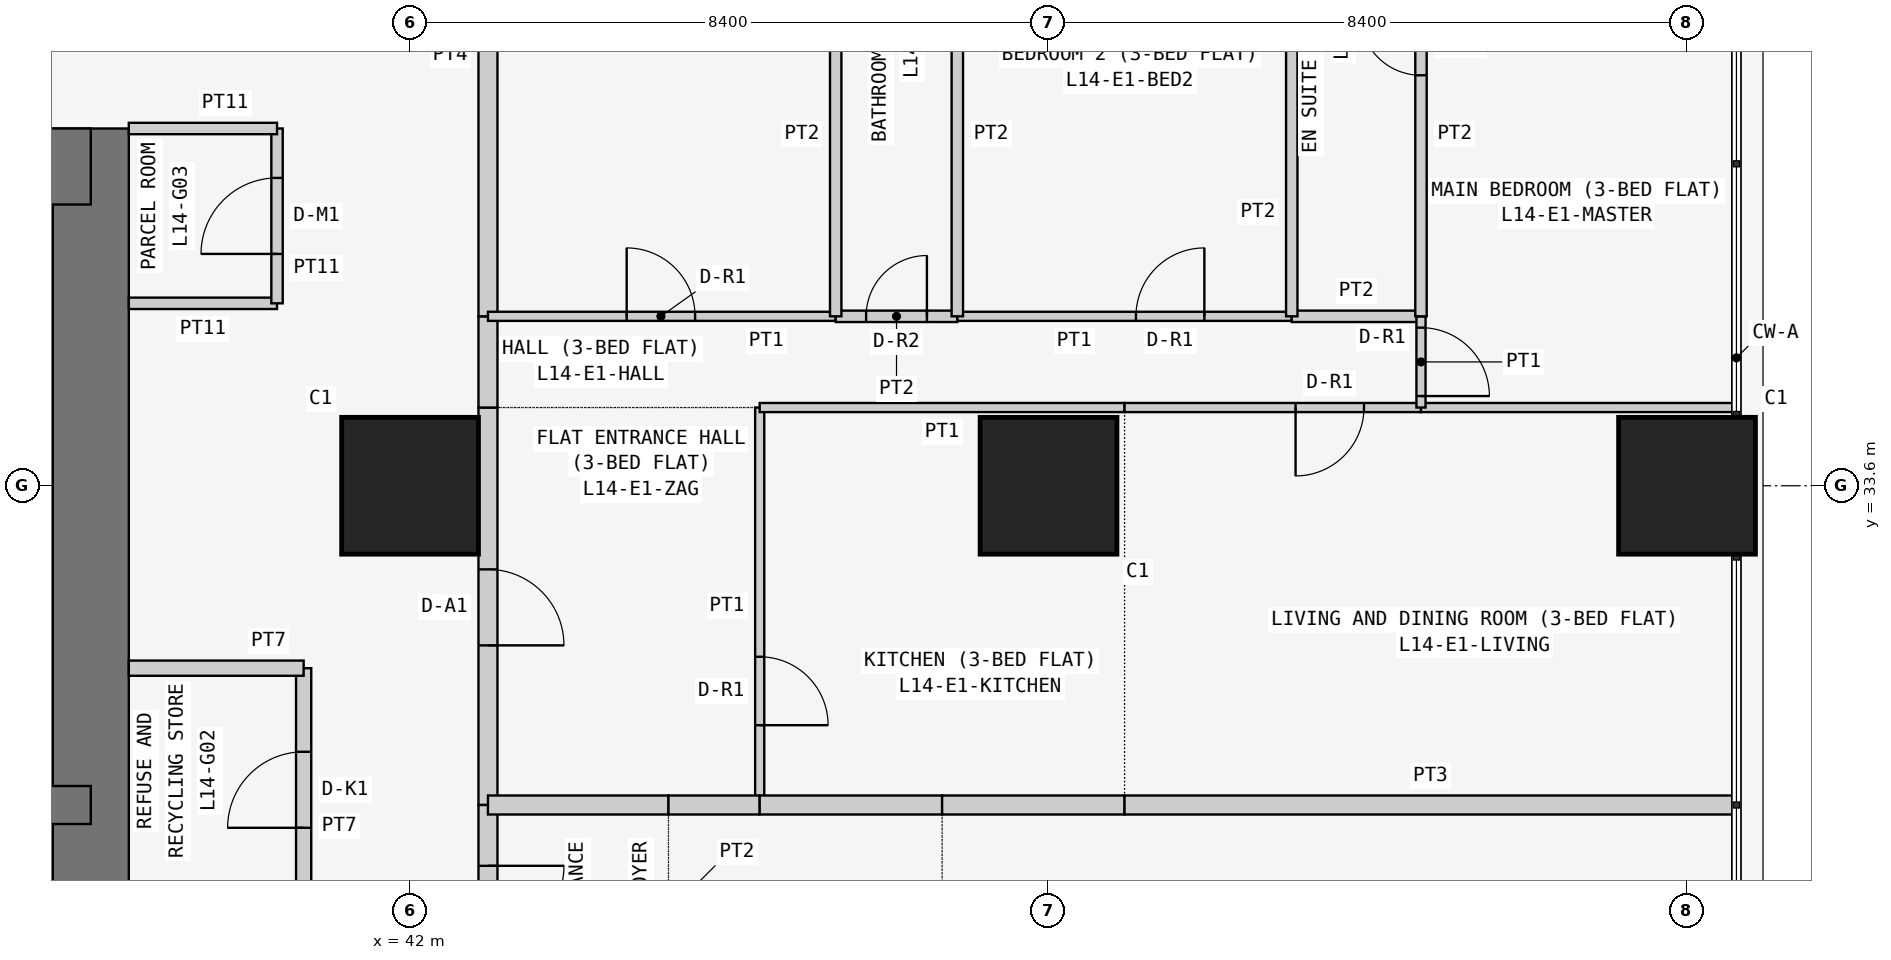
"""IFC4 building model, lengths in metres.
Left out: names, types, materials, properties, quantities, classifications, styles, units other than length and angle.
Written with IfcOpenShell. Run it as: python <this file> out.ifc"""

import sys

from ifc_helpers import new_model, si_unit, direction, frame, frame_2d, origin, origin_2d, place, context, subcontext, project, spatial, rectangle, extrude, element, fill, save


model = new_model("IFC4")
c1 = context("Model", 3, precision=1e-05, world=origin(), true_north=direction((0.0, 1.0)))
c2 = subcontext(c1, "Body", "Model", "MODEL_VIEW")
j1 = project(units=[si_unit("LENGTHUNIT", "METRE"), si_unit("PLANEANGLEUNIT", "RADIAN")], contexts=[c1])
p1 = place(None, origin())
s1 = spatial("IfcSite", under=j1, at=p1, CompositionType="ELEMENT")
p2 = place(p1, origin())
s2 = spatial("IfcBuilding", under=s1, at=p2, CompositionType="ELEMENT")
p3 = place(p2, frame((0.0, 0.0, 59.7)))
s3 = spatial("IfcBuildingStorey", under=s2, at=p3, CompositionType="ELEMENT", Elevation=59.7)
for number, where, z_axis, x_axis in (
    (1, (42.0, 33.6, 0.0), (0.0, 0.0, 1.0), (1.0, 0.0, 0.0)),
    (2, (50.4, 33.6, 0.0), (0.0, 0.0, 1.0), (1.0, 0.0, 0.0)),
    (3, (58.8, 33.6, 0.0), (0.0, 0.0, 1.0), (1.0, 0.0, 0.0)),
):
    element("IfcColumn", number, at=place(p3, frame(where, z_axis=z_axis, x_axis=x_axis)), inside=s3, PredefinedType="COLUMN", context=c2, shape_type="SweptSolid", body=[
        extrude(rectangle(XDim=1.8, YDim=1.8, at=origin_2d()), origin(), (0.0, 0.0, 1.0), 3.6),
    ])
p4 = place(p3, frame((37.8, 21.0, 0.0), z_axis=(0.0, 0.0, 1.0), x_axis=(0.0, 1.0, 0.0)))
e4 = element("IfcWall", 4, at=p4, inside=s3, PredefinedType="SHEAR", context=c2, shape_type="SweptSolid", body=[
    extrude(rectangle(XDim=17.3, YDim=1.0, at=frame_2d((8.65, 0.0))), origin(), (0.0, 0.0, 1.0), 3.6),
])
p5 = place(p4, frame((5.2, 0.0, 0.0)))
e5 = element("IfcOpeningElement", 5, at=p5, cuts=e4, PredefinedType="OPENING", context=c2, shape_type="SweptSolid", body=[
    extrude(rectangle(XDim=1.2, YDim=2.1, at=frame_2d((0.6, 1.05))), frame((0.0, 0.51, 0.0), z_axis=(0.0, -1.0, 0.0), x_axis=(1.0, 0.0, 0.0)), (0.0, 0.0, 1.0), 1.02),
])
p6 = place(p3, frame((37.8, 37.8, 0.0), z_axis=(0.0, 0.0, 1.0), x_axis=(-1.0, 0.0, 0.0)))
e6 = element("IfcWall", 6, at=p6, inside=s3, PredefinedType="SHEAR", context=c2, shape_type="SweptSolid", body=[
    extrude(rectangle(XDim=17.3, YDim=1.0, at=frame_2d((8.65, 0.0))), origin(), (0.0, 0.0, 1.0), 3.6),
])
p7 = place(p3, frame((32.2, 29.4, 0.0), z_axis=(0.0, 0.0, 1.0), x_axis=(1.0, 0.0, 0.0)))
e7 = element("IfcWall", 7, at=p7, inside=s3, PredefinedType="SHEAR", context=c2, shape_type="SweptSolid", body=[
    extrude(rectangle(XDim=5.6, YDim=0.5, at=frame_2d((2.8, 0.0))), origin(), (0.0, 0.0, 1.0), 3.6),
])
p8 = place(p7, frame((2.0, 0.0, 0.0)))
e8 = element("IfcOpeningElement", 8, at=p8, cuts=e7, PredefinedType="OPENING", context=c2, shape_type="SweptSolid", body=[
    extrude(rectangle(XDim=1.2, YDim=2.1, at=frame_2d((0.6, 1.05))), frame((0.0, 0.26, 0.0), z_axis=(0.0, -1.0, 0.0), x_axis=(1.0, 0.0, 0.0)), (0.0, 0.0, 1.0), 0.52),
])
p9 = place(p3, frame((40.6, 28.0, 0.0), z_axis=(0.0, 0.0, 1.0), x_axis=(0.0, 1.0, 0.0)))
e9 = element("IfcWall", 9, at=p9, inside=s3, PredefinedType="PARTITIONING", context=c2, shape_type="SweptSolid", body=[
    extrude(rectangle(XDim=3.2, YDim=0.2, at=frame_2d((1.6, 0.0))), origin(), (0.0, 0.0, 1.0), 3.45),
])
p10 = place(p9, frame((1.1, 0.0, 0.0)))
e10 = element("IfcOpeningElement", 10, at=p10, cuts=e9, PredefinedType="OPENING", context=c2, shape_type="SweptSolid", body=[
    extrude(rectangle(XDim=1.0, YDim=2.1, at=frame_2d((0.5, 1.05))), frame((0.0, 0.11, 0.0), z_axis=(0.0, -1.0, 0.0), x_axis=(1.0, 0.0, 0.0)), (0.0, 0.0, 1.0), 0.22),
])
p11 = place(p3, frame((40.6, 31.2, 0.0), z_axis=(0.0, 0.0, 1.0), x_axis=(-1.0, 0.0, 0.0)))
e11 = element("IfcWall", 11, at=p11, inside=s3, PredefinedType="PARTITIONING", context=c2, shape_type="SweptSolid", body=[
    extrude(rectangle(XDim=2.3, YDim=0.2, at=frame_2d((1.15, 0.0))), origin(), (0.0, 0.0, 1.0), 3.45),
])
p12 = place(p3, frame((38.3, 36.0, 0.0), z_axis=(0.0, 0.0, 1.0), x_axis=(1.0, 0.0, 0.0)))
e12 = element("IfcWall", 12, at=p12, inside=s3, PredefinedType="PARTITIONING", context=c2, shape_type="SweptSolid", body=[
    extrude(rectangle(XDim=1.95, YDim=0.15, at=frame_2d((0.975, 0.0))), origin(), (0.0, 0.0, 1.0), 3.45),
])
p13 = place(p3, frame((40.25, 36.0, 0.0), z_axis=(0.0, 0.0, 1.0), x_axis=(0.0, 1.0, 0.0)))
e13 = element("IfcWall", 13, at=p13, inside=s3, PredefinedType="PARTITIONING", context=c2, shape_type="SweptSolid", body=[
    extrude(rectangle(XDim=2.3, YDim=0.15, at=frame_2d((1.15, 0.0))), origin(), (0.0, 0.0, 1.0), 3.45),
])
p14 = place(p13, frame((0.65, 0.0, 0.0)))
e14 = element("IfcOpeningElement", 14, at=p14, cuts=e13, PredefinedType="OPENING", context=c2, shape_type="SweptSolid", body=[
    extrude(rectangle(XDim=1.0, YDim=2.1, at=frame_2d((0.5, 1.05))), frame((0.0, 0.085, 0.0), z_axis=(0.0, -1.0, 0.0), x_axis=(1.0, 0.0, 0.0)), (0.0, 0.0, 1.0), 0.17),
])
p15 = place(p3, frame((40.25, 38.3, 0.0), z_axis=(0.0, 0.0, 1.0), x_axis=(-1.0, 0.0, 0.0)))
e15 = element("IfcWall", 15, at=p15, inside=s3, PredefinedType="PARTITIONING", context=c2, shape_type="SweptSolid", body=[
    extrude(rectangle(XDim=1.95, YDim=0.15, at=frame_2d((0.975, 0.0))), origin(), (0.0, 0.0, 1.0), 3.45),
])
p16 = place(p3, frame((43.025, 34.629, 0.0), z_axis=(0.0, 0.0, 1.0), x_axis=(0.0, -1.0, 0.0)))
e16 = element("IfcWall", 16, at=p16, inside=s3, PredefinedType="PARTITIONING", context=c2, shape_type="SweptSolid", body=[
    extrude(rectangle(XDim=5.229, YDim=0.25, at=frame_2d((2.615, 0.0))), origin(), (0.0, 0.0, 1.0), 3.45),
])
p17 = place(p16, frame((2.129, 0.0, 0.0)))
e17 = element("IfcOpeningElement", 17, at=p17, cuts=e16, PredefinedType="OPENING", context=c2, shape_type="SweptSolid", body=[
    extrude(rectangle(XDim=1.0, YDim=2.1, at=frame_2d((0.5, 1.05))), frame((0.0, 0.135, 0.0), z_axis=(0.0, -1.0, 0.0), x_axis=(1.0, 0.0, 0.0)), (0.0, 0.0, 1.0), 0.27),
])
p18 = place(p3, frame((43.025, 35.829, 0.0), z_axis=(0.0, 0.0, 1.0), x_axis=(0.0, -1.0, 0.0)))
e18 = element("IfcWall", 18, at=p18, inside=s3, PredefinedType="PARTITIONING", context=c2, shape_type="SweptSolid", body=[
    extrude(rectangle(XDim=1.2, YDim=0.25, at=frame_2d((0.6, 0.0))), origin(), (0.0, 0.0, 1.0), 3.45),
])
p19 = place(p3, frame((43.025, 42.7, 0.0), z_axis=(0.0, 0.0, 1.0), x_axis=(0.0, -1.0, 0.0)))
e19 = element("IfcWall", 19, at=p19, inside=s3, PredefinedType="PARTITIONING", context=c2, shape_type="SweptSolid", body=[
    extrude(rectangle(XDim=6.871, YDim=0.25, at=frame_2d((3.436, 0.0))), origin(), (0.0, 0.0, 1.0), 3.45),
])
p20 = place(p3, frame((43.025, 29.4, 0.0), z_axis=(0.0, 0.0, 1.0), x_axis=(0.0, -1.0, 0.0)))
e20 = element("IfcWall", 20, at=p20, inside=s3, PredefinedType="PARTITIONING", context=c2, shape_type="SweptSolid", body=[
    extrude(rectangle(XDim=2.6, YDim=0.25, at=frame_2d((1.3, 0.0))), origin(), (0.0, 0.0, 1.0), 3.45),
])
p21 = place(p20, frame((0.8, 0.0, 0.0)))
e21 = element("IfcOpeningElement", 21, at=p21, cuts=e20, PredefinedType="OPENING", context=c2, shape_type="SweptSolid", body=[
    extrude(rectangle(XDim=1.0, YDim=2.1, at=frame_2d((0.5, 1.05))), frame((0.0, 0.135, 0.0), z_axis=(0.0, -1.0, 0.0), x_axis=(1.0, 0.0, 0.0)), (0.0, 0.0, 1.0), 0.27),
])
p22 = place(p3, frame((46.6, 29.4, 0.0), z_axis=(0.0, 0.0, 1.0), x_axis=(0.0, 1.0, 0.0)))
e22 = element("IfcWall", 22, at=p22, inside=s3, PredefinedType="PARTITIONING", context=c2, shape_type="SweptSolid", body=[
    extrude(rectangle(XDim=5.229, YDim=0.12, at=frame_2d((2.615, 0.0))), origin(), (0.0, 0.0, 1.0), 3.45),
])
p23 = place(p22, frame((1.05, 0.0, 0.0)))
e23 = element("IfcOpeningElement", 23, at=p23, cuts=e22, PredefinedType="OPENING", context=c2, shape_type="SweptSolid", body=[
    extrude(rectangle(XDim=0.9, YDim=2.1, at=frame_2d((0.45, 1.05))), frame((0.0, 0.07, 0.0), z_axis=(0.0, -1.0, 0.0), x_axis=(1.0, 0.0, 0.0)), (0.0, 0.0, 1.0), 0.14),
])
p24 = place(p3, frame((43.025, 29.4, 0.0), z_axis=(0.0, 0.0, 1.0), x_axis=(1.0, 0.0, 0.0)))
e24 = element("IfcWall", 24, at=p24, inside=s3, PredefinedType="PARTITIONING", context=c2, shape_type="SweptSolid", body=[
    extrude(rectangle(XDim=2.375, YDim=0.25, at=frame_2d((1.188, 0.0))), origin(), (0.0, 0.0, 1.0), 3.45),
])
p25 = place(p3, frame((45.4, 29.4, 0.0), z_axis=(0.0, 0.0, 1.0), x_axis=(1.0, 0.0, 0.0)))
e25 = element("IfcWall", 25, at=p25, inside=s3, PredefinedType="PARTITIONING", context=c2, shape_type="SweptSolid", body=[
    extrude(rectangle(XDim=1.2, YDim=0.25, at=frame_2d((0.6, 0.0))), origin(), (0.0, 0.0, 1.0), 3.45),
])
p26 = place(p3, frame((51.4, 34.629, 0.0), z_axis=(0.0, 0.0, 1.0), x_axis=(-1.0, 0.0, 0.0)))
e26 = element("IfcWall", 26, at=p26, inside=s3, PredefinedType="PARTITIONING", context=c2, shape_type="SweptSolid", body=[
    extrude(rectangle(XDim=4.8, YDim=0.12, at=frame_2d((2.4, 0.0))), origin(), (0.0, 0.0, 1.0), 3.45),
])
for number, where, z_axis, x_axis in (
    (27, (46.6, 29.4, 0.0), (0.0, 0.0, 1.0), (1.0, 0.0, 0.0)),
    (28, (49.0, 29.4, 0.0), (0.0, 0.0, 1.0), (1.0, 0.0, 0.0)),
):
    element("IfcWall", number, at=place(p3, frame(where, z_axis=z_axis, x_axis=x_axis)), inside=s3, PredefinedType="PARTITIONING", context=c2, shape_type="SweptSolid", body=[
        extrude(rectangle(XDim=2.4, YDim=0.25, at=frame_2d((1.2, 0.0))), origin(), (0.0, 0.0, 1.0), 3.45),
    ])
p27 = place(p3, frame((55.3, 34.629, 0.0), z_axis=(0.0, 0.0, 1.0), x_axis=(-1.0, 0.0, 0.0)))
e29 = element("IfcWall", 29, at=p27, inside=s3, PredefinedType="PARTITIONING", context=c2, shape_type="SweptSolid", body=[
    extrude(rectangle(XDim=3.9, YDim=0.12, at=frame_2d((1.95, 0.0))), origin(), (0.0, 0.0, 1.0), 3.45),
])
p28 = place(p27, frame((0.75, 0.0, 0.0)))
e30 = element("IfcOpeningElement", 30, at=p28, cuts=e29, PredefinedType="OPENING", context=c2, shape_type="SweptSolid", body=[
    extrude(rectangle(XDim=0.9, YDim=2.1, at=frame_2d((0.45, 1.05))), frame((0.0, 0.07, 0.0), z_axis=(0.0, -1.0, 0.0), x_axis=(1.0, 0.0, 0.0)), (0.0, 0.0, 1.0), 0.14),
])
p29 = place(p3, frame((59.45, 34.629, 0.0), z_axis=(0.0, 0.0, 1.0), x_axis=(-1.0, 0.0, 0.0)))
e31 = element("IfcWall", 31, at=p29, inside=s3, PredefinedType="PARTITIONING", context=c2, shape_type="SweptSolid", body=[
    extrude(rectangle(XDim=4.15, YDim=0.12, at=frame_2d((2.075, 0.0))), origin(), (0.0, 0.0, 1.0), 3.45),
])
p30 = place(p3, frame((51.4, 29.4, 0.0), z_axis=(0.0, 0.0, 1.0), x_axis=(1.0, 0.0, 0.0)))
e32 = element("IfcWall", 32, at=p30, inside=s3, PredefinedType="PARTITIONING", context=c2, shape_type="SweptSolid", body=[
    extrude(rectangle(XDim=8.05, YDim=0.25, at=frame_2d((4.025, 0.0))), origin(), (0.0, 0.0, 1.0), 3.45),
])
p31 = place(p3, frame((47.6, 35.829, 0.0), z_axis=(0.0, 0.0, 1.0), x_axis=(-1.0, 0.0, 0.0)))
e33 = element("IfcWall", 33, at=p31, inside=s3, PredefinedType="PARTITIONING", context=c2, shape_type="SweptSolid", body=[
    extrude(rectangle(XDim=4.575, YDim=0.12, at=frame_2d((2.288, 0.0))), origin(), (0.0, 0.0, 1.0), 3.45),
])
p32 = place(p31, frame((1.85, 0.0, 0.0)))
e34 = element("IfcOpeningElement", 34, at=p32, cuts=e33, PredefinedType="OPENING", context=c2, shape_type="SweptSolid", body=[
    extrude(rectangle(XDim=0.9, YDim=2.1, at=frame_2d((0.45, 1.05))), frame((0.0, 0.07, 0.0), z_axis=(0.0, -1.0, 0.0), x_axis=(1.0, 0.0, 0.0)), (0.0, 0.0, 1.0), 0.14),
])
p33 = place(p3, frame((49.2, 35.829, 0.0), z_axis=(0.0, 0.0, 1.0), x_axis=(-1.0, 0.0, 0.0)))
e35 = element("IfcWall", 35, at=p33, inside=s3, PredefinedType="PARTITIONING", context=c2, shape_type="SweptSolid", body=[
    extrude(rectangle(XDim=1.6, YDim=0.15, at=frame_2d((0.8, 0.0))), origin(), (0.0, 0.0, 1.0), 3.45),
])
p34 = place(p33, frame((0.4, 0.0, 0.0)))
e36 = element("IfcOpeningElement", 36, at=p34, cuts=e35, PredefinedType="OPENING", context=c2, shape_type="SweptSolid", body=[
    extrude(rectangle(XDim=0.8, YDim=2.1, at=frame_2d((0.4, 1.05))), frame((0.0, 0.085, 0.0), z_axis=(0.0, -1.0, 0.0), x_axis=(1.0, 0.0, 0.0)), (0.0, 0.0, 1.0), 0.17),
])
p35 = place(p3, frame((53.6, 35.829, 0.0), z_axis=(0.0, 0.0, 1.0), x_axis=(-1.0, 0.0, 0.0)))
e37 = element("IfcWall", 37, at=p35, inside=s3, PredefinedType="PARTITIONING", context=c2, shape_type="SweptSolid", body=[
    extrude(rectangle(XDim=4.4, YDim=0.12, at=frame_2d((2.2, 0.0))), origin(), (0.0, 0.0, 1.0), 3.45),
])
p36 = place(p35, frame((1.15, 0.0, 0.0)))
e38 = element("IfcOpeningElement", 38, at=p36, cuts=e37, PredefinedType="OPENING", context=c2, shape_type="SweptSolid", body=[
    extrude(rectangle(XDim=0.9, YDim=2.1, at=frame_2d((0.45, 1.05))), frame((0.0, 0.07, 0.0), z_axis=(0.0, -1.0, 0.0), x_axis=(1.0, 0.0, 0.0)), (0.0, 0.0, 1.0), 0.14),
])
p37 = place(p3, frame((55.3, 35.829, 0.0), z_axis=(0.0, 0.0, 1.0), x_axis=(-1.0, 0.0, 0.0)))
e39 = element("IfcWall", 39, at=p37, inside=s3, PredefinedType="PARTITIONING", context=c2, shape_type="SweptSolid", body=[
    extrude(rectangle(XDim=1.7, YDim=0.15, at=frame_2d((0.85, 0.0))), origin(), (0.0, 0.0, 1.0), 3.45),
])
p38 = place(p3, frame((55.3, 34.629, 0.0), z_axis=(0.0, 0.0, 1.0), x_axis=(0.0, 1.0, 0.0)))
e40 = element("IfcWall", 40, at=p38, inside=s3, PredefinedType="PARTITIONING", context=c2, shape_type="SweptSolid", body=[
    extrude(rectangle(XDim=1.2, YDim=0.12, at=frame_2d((0.6, 0.0))), origin(), (0.0, 0.0, 1.0), 3.45),
])
p39 = place(p38, frame((0.151, 0.0, 0.0)))
e41 = element("IfcOpeningElement", 41, at=p39, cuts=e40, PredefinedType="OPENING", context=c2, shape_type="SweptSolid", body=[
    extrude(rectangle(XDim=0.9, YDim=2.1, at=frame_2d((0.45, 1.05))), frame((0.0, 0.07, 0.0), z_axis=(0.0, -1.0, 0.0), x_axis=(1.0, 0.0, 0.0)), (0.0, 0.0, 1.0), 0.14),
])
for number, where, z_axis, x_axis in (
    (42, (47.6, 35.829, 0.0), (0.0, 0.0, 1.0), (0.0, 1.0, 0.0)),
    (43, (49.2, 35.829, 0.0), (0.0, 0.0, 1.0), (0.0, 1.0, 0.0)),
    (44, (53.6, 35.829, 0.0), (0.0, 0.0, 1.0), (0.0, 1.0, 0.0)),
):
    element("IfcWall", number, at=place(p3, frame(where, z_axis=z_axis, x_axis=x_axis)), inside=s3, PredefinedType="PARTITIONING", context=c2, shape_type="SweptSolid", body=[
        extrude(rectangle(XDim=6.871, YDim=0.15, at=frame_2d((3.436, 0.0))), origin(), (0.0, 0.0, 1.0), 3.45),
    ])
p40 = place(p3, frame((55.3, 35.829, 0.0), z_axis=(0.0, 0.0, 1.0), x_axis=(0.0, 1.0, 0.0)))
e45 = element("IfcWall", 45, at=p40, inside=s3, PredefinedType="PARTITIONING", context=c2, shape_type="SweptSolid", body=[
    extrude(rectangle(XDim=6.871, YDim=0.15, at=frame_2d((3.436, 0.0))), origin(), (0.0, 0.0, 1.0), 3.45),
])
p41 = place(p40, frame((3.171, 0.0, 0.0)))
e46 = element("IfcOpeningElement", 46, at=p41, cuts=e45, PredefinedType="OPENING", context=c2, shape_type="SweptSolid", body=[
    extrude(rectangle(XDim=0.8, YDim=2.1, at=frame_2d((0.4, 1.05))), frame((0.0, 0.085, 0.0), z_axis=(0.0, -1.0, 0.0), x_axis=(1.0, 0.0, 0.0)), (0.0, 0.0, 1.0), 0.17),
])
p42 = place(p10, origin())
e47 = element("IfcDoor", 47, at=p42, inside=s3, OperationType="SINGLE_SWING_LEFT", PredefinedType="DOOR", context=c2, shape_type="SweptSolid", body=[
    extrude(rectangle(XDim=1.0, YDim=2.1, at=frame_2d((0.5, 1.05))), frame((0.0, 0.025, 0.0), z_axis=(0.0, -1.0, 0.0), x_axis=(1.0, 0.0, 0.0)), (0.0, 0.0, 1.0), 0.05),
])
fill(e10, e47)
p43 = place(p14, origin())
e48 = element("IfcDoor", 48, at=p43, inside=s3, OperationType="SINGLE_SWING_LEFT", PredefinedType="DOOR", context=c2, shape_type="SweptSolid", body=[
    extrude(rectangle(XDim=1.0, YDim=2.1, at=frame_2d((0.5, 1.05))), frame((0.0, 0.025, 0.0), z_axis=(0.0, -1.0, 0.0), x_axis=(1.0, 0.0, 0.0)), (0.0, 0.0, 1.0), 0.05),
])
fill(e14, e48)
p44 = place(p17, origin())
e49 = element("IfcDoor", 49, at=p44, inside=s3, OperationType="SINGLE_SWING_RIGHT", PredefinedType="DOOR", context=c2, shape_type="SweptSolid", body=[
    extrude(rectangle(XDim=1.0, YDim=2.1, at=frame_2d((0.5, 1.05))), frame((0.0, 0.025, 0.0), z_axis=(0.0, -1.0, 0.0), x_axis=(1.0, 0.0, 0.0)), (0.0, 0.0, 1.0), 0.05),
])
fill(e17, e49)
p45 = place(p23, frame((0.9, 0.0, 0.0), z_axis=(0.0, 0.0, 1.0), x_axis=(-1.0, 0.0, 0.0)))
e50 = element("IfcDoor", 50, at=p45, inside=s3, OperationType="SINGLE_SWING_RIGHT", PredefinedType="DOOR", context=c2, shape_type="SweptSolid", body=[
    extrude(rectangle(XDim=0.9, YDim=2.1, at=frame_2d((0.45, 1.05))), frame((0.0, 0.025, 0.0), z_axis=(0.0, -1.0, 0.0), x_axis=(1.0, 0.0, 0.0)), (0.0, 0.0, 1.0), 0.05),
])
fill(e23, e50)
p46 = place(p28, origin())
e51 = element("IfcDoor", 51, at=p46, inside=s3, OperationType="SINGLE_SWING_RIGHT", PredefinedType="DOOR", context=c2, shape_type="SweptSolid", body=[
    extrude(rectangle(XDim=0.9, YDim=2.1, at=frame_2d((0.45, 1.05))), frame((0.0, 0.025, 0.0), z_axis=(0.0, -1.0, 0.0), x_axis=(1.0, 0.0, 0.0)), (0.0, 0.0, 1.0), 0.05),
])
fill(e30, e51)
p47 = place(p32, frame((0.9, 0.0, 0.0), z_axis=(0.0, 0.0, 1.0), x_axis=(-1.0, 0.0, 0.0)))
e52 = element("IfcDoor", 52, at=p47, inside=s3, OperationType="SINGLE_SWING_LEFT", PredefinedType="DOOR", context=c2, shape_type="SweptSolid", body=[
    extrude(rectangle(XDim=0.9, YDim=2.1, at=frame_2d((0.45, 1.05))), frame((0.0, 0.025, 0.0), z_axis=(0.0, -1.0, 0.0), x_axis=(1.0, 0.0, 0.0)), (0.0, 0.0, 1.0), 0.05),
])
fill(e34, e52)
p48 = place(p34, frame((0.8, 0.0, 0.0), z_axis=(0.0, 0.0, 1.0), x_axis=(-1.0, 0.0, 0.0)))
e53 = element("IfcDoor", 53, at=p48, inside=s3, OperationType="SINGLE_SWING_RIGHT", PredefinedType="DOOR", context=c2, shape_type="SweptSolid", body=[
    extrude(rectangle(XDim=0.8, YDim=2.1, at=frame_2d((0.4, 1.05))), frame((0.0, 0.025, 0.0), z_axis=(0.0, -1.0, 0.0), x_axis=(1.0, 0.0, 0.0)), (0.0, 0.0, 1.0), 0.05),
])
fill(e36, e53)
p49 = place(p36, frame((0.9, 0.0, 0.0), z_axis=(0.0, 0.0, 1.0), x_axis=(-1.0, 0.0, 0.0)))
e54 = element("IfcDoor", 54, at=p49, inside=s3, OperationType="SINGLE_SWING_RIGHT", PredefinedType="DOOR", context=c2, shape_type="SweptSolid", body=[
    extrude(rectangle(XDim=0.9, YDim=2.1, at=frame_2d((0.45, 1.05))), frame((0.0, 0.025, 0.0), z_axis=(0.0, -1.0, 0.0), x_axis=(1.0, 0.0, 0.0)), (0.0, 0.0, 1.0), 0.05),
])
fill(e38, e54)
p50 = place(p39, frame((0.9, 0.0, 0.0), z_axis=(0.0, 0.0, 1.0), x_axis=(-1.0, 0.0, 0.0)))
e55 = element("IfcDoor", 55, at=p50, inside=s3, OperationType="SINGLE_SWING_RIGHT", PredefinedType="DOOR", context=c2, shape_type="SweptSolid", body=[
    extrude(rectangle(XDim=0.9, YDim=2.1, at=frame_2d((0.45, 1.05))), frame((0.0, 0.025, 0.0), z_axis=(0.0, -1.0, 0.0), x_axis=(1.0, 0.0, 0.0)), (0.0, 0.0, 1.0), 0.05),
])
fill(e41, e55)
p51 = place(p41, origin())
e56 = element("IfcDoor", 56, at=p51, inside=s3, OperationType="SINGLE_SWING_RIGHT", PredefinedType="DOOR", context=c2, shape_type="SweptSolid", body=[
    extrude(rectangle(XDim=0.8, YDim=2.1, at=frame_2d((0.4, 1.05))), frame((0.0, 0.025, 0.0), z_axis=(0.0, -1.0, 0.0), x_axis=(1.0, 0.0, 0.0)), (0.0, 0.0, 1.0), 0.05),
])
fill(e46, e56)
p52 = place(p21, origin())
e57 = element("IfcDoor", 57, at=p52, inside=s3, OperationType="SINGLE_SWING_LEFT", PredefinedType="DOOR", context=c2, shape_type="SweptSolid", body=[
    extrude(rectangle(XDim=1.0, YDim=2.1, at=frame_2d((0.5, 1.05))), frame((0.0, 0.025, 0.0), z_axis=(0.0, -1.0, 0.0), x_axis=(1.0, 0.0, 0.0)), (0.0, 0.0, 1.0), 0.05),
])
fill(e21, e57)
save(model, sys.argv[1])
